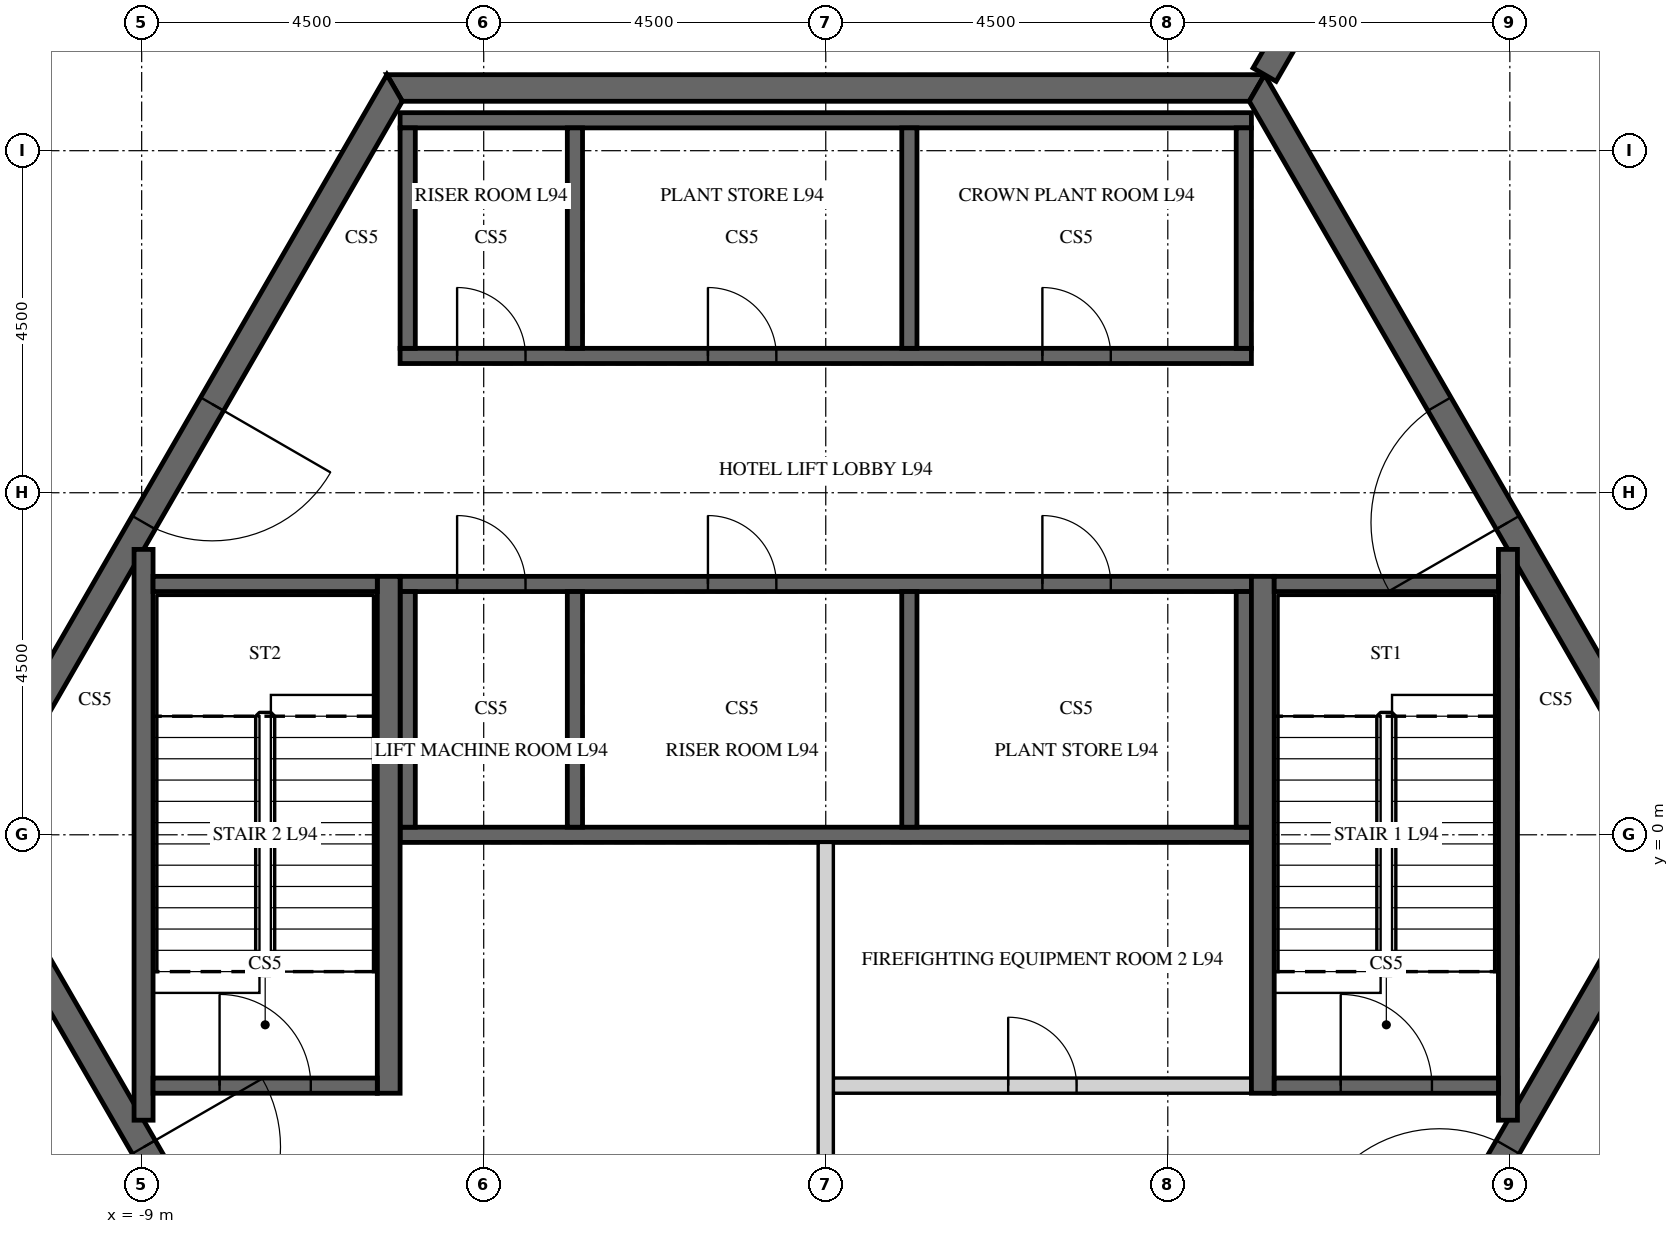
"""IFC4 building model, lengths in metres.
Left out: names, types, materials, properties, quantities, classifications, styles, units other than length and angle.
Written with IfcOpenShell. Run it as: python <this file> out.ifc"""

import sys

from ifc_helpers import new_model, si_unit, direction, frame, frame_2d, origin, place, context, subcontext, project, spatial, polyline, rectangle, outline, extrude, element, fill, save


model = new_model("IFC4")
c1 = context("Model", 3, precision=1e-05, world=origin(), true_north=direction((0.0, 1.0)))
c2 = subcontext(c1, "Body", "Model", "MODEL_VIEW")
j1 = project(units=[si_unit("LENGTHUNIT", "METRE"), si_unit("PLANEANGLEUNIT", "RADIAN")], contexts=[c1])
p1 = place(None, origin())
s1 = spatial("IfcSite", under=j1, at=p1, CompositionType="ELEMENT")
p2 = place(p1, origin())
s2 = spatial("IfcBuilding", under=s1, at=p2, CompositionType="ELEMENT")
p3 = place(p2, frame((0.0, 0.0, 397.2)))
s3 = spatial("IfcBuildingStorey", under=s2, at=p3, CompositionType="ELEMENT", Elevation=397.2)
p4 = place(p3, frame((9.618, 14.174, 4.5), z_axis=(0.0, 0.0, 1.0), x_axis=(0.559191500603, -0.8290385188, 0.0)))
e1 = element("IfcWall", 1, at=p4, inside=s3, PredefinedType="PARAPET", context=c2, shape_type="SweptSolid", body=[
    extrude(outline(polyline([(0.008, -0.1), (13.852, -0.1), (13.871, 0.1), (-0.008, 0.1), (0.008, -0.1)])), origin(), (0.0, 0.0, 1.0), 1.1),
])
p5 = place(p3, frame((-10.025, -14.436, 4.5), z_axis=(0.0, 0.0, 1.0), x_axis=(-0.500009078442, 0.86602016228, 0.0)))
e2 = element("IfcWall", 2, at=p5, inside=s3, PredefinedType="PARAPET", context=c2, shape_type="SweptSolid", body=[
    extrude(outline(polyline([(0.009, -0.1), (13.854, -0.1), (13.87, 0.1), (-0.009, 0.1), (0.009, -0.1)])), origin(), (0.0, 0.0, 1.0), 1.1),
])
p6 = place(p3, frame((-5.673, 9.825, -0.2), z_axis=(0.0, 0.0, 1.0), x_axis=(-0.499995046907, -0.866028263435, 0.0)))
e3 = element("IfcWall", 3, at=p6, inside=s3, PredefinedType="SHEAR", context=c2, shape_type="SweptSolid", body=[
    extrude(outline(polyline([(-0.101, -0.175), (11.446, -0.175), (11.244, 0.175), (0.101, 0.175), (-0.101, -0.175)])), origin(), (0.0, 0.0, 1.0), 4.5),
])
p7 = place(p6, frame((4.801, 0.0, 0.2)))
e4 = element("IfcOpeningElement", 4, at=p7, cuts=e3, PredefinedType="OPENING", context=c2, shape_type="SweptSolid", body=[
    extrude(rectangle(XDim=1.8, YDim=2.4, at=frame_2d((0.9, 1.2))), frame((0.0, 0.185, 0.0), z_axis=(0.0, -1.0, 0.0), x_axis=(1.0, 0.0, 0.0)), (0.0, 0.0, 1.0), 0.37),
])
p8 = place(p3, frame((-11.345, 0.0, -0.2), z_axis=(0.0, 0.0, 1.0), x_axis=(0.499995046907, -0.866028263435, 0.0)))
e5 = element("IfcWall", 5, at=p8, inside=s3, PredefinedType="SHEAR", context=c2, shape_type="SweptSolid", body=[
    extrude(outline(polyline([(-0.101, -0.175), (11.446, -0.175), (11.244, 0.175), (0.101, 0.175), (-0.101, -0.175)])), origin(), (0.0, 0.0, 1.0), 4.5),
])
p9 = place(p8, frame((4.744, 0.0, 0.2)))
e6 = element("IfcOpeningElement", 6, at=p9, cuts=e5, PredefinedType="OPENING", context=c2, shape_type="SweptSolid", body=[
    extrude(rectangle(XDim=1.8, YDim=2.4, at=frame_2d((0.9, 1.2))), frame((0.0, 0.185, 0.0), z_axis=(0.0, -1.0, 0.0), x_axis=(1.0, 0.0, 0.0)), (0.0, 0.0, 1.0), 0.37),
])
p10 = place(p3, frame((5.673, -9.825, -0.2), z_axis=(0.0, 0.0, 1.0), x_axis=(0.499995046907, 0.866028263435, 0.0)))
e7 = element("IfcWall", 7, at=p10, inside=s3, PredefinedType="SHEAR", context=c2, shape_type="SweptSolid", body=[
    extrude(outline(polyline([(-0.101, -0.175), (11.446, -0.175), (11.244, 0.175), (0.101, 0.175), (-0.101, -0.175)])), origin(), (0.0, 0.0, 1.0), 4.5),
])
p11 = place(p10, frame((4.801, 0.0, 0.2)))
e8 = element("IfcOpeningElement", 8, at=p11, cuts=e7, PredefinedType="OPENING", context=c2, shape_type="SweptSolid", body=[
    extrude(rectangle(XDim=1.8, YDim=2.4, at=frame_2d((0.9, 1.2))), frame((0.0, 0.185, 0.0), z_axis=(0.0, -1.0, 0.0), x_axis=(1.0, 0.0, 0.0)), (0.0, 0.0, 1.0), 0.37),
])
p12 = place(p3, frame((11.345, 0.0, -0.2), z_axis=(0.0, 0.0, 1.0), x_axis=(-0.499995046907, 0.866028263435, 0.0)))
e9 = element("IfcWall", 9, at=p12, inside=s3, PredefinedType="SHEAR", context=c2, shape_type="SweptSolid", body=[
    extrude(outline(polyline([(-0.101, -0.175), (11.446, -0.175), (11.244, 0.175), (0.101, 0.175), (-0.101, -0.175)])), origin(), (0.0, 0.0, 1.0), 4.5),
])
p13 = place(p12, frame((4.744, 0.0, 0.2)))
e10 = element("IfcOpeningElement", 10, at=p13, cuts=e9, PredefinedType="OPENING", context=c2, shape_type="SweptSolid", body=[
    extrude(rectangle(XDim=1.8, YDim=2.4, at=frame_2d((0.9, 1.2))), frame((0.0, 0.185, 0.0), z_axis=(0.0, -1.0, 0.0), x_axis=(1.0, 0.0, 0.0)), (0.0, 0.0, 1.0), 0.37),
])
p14 = place(p3, frame((5.673, 9.825, -0.2), z_axis=(0.0, 0.0, 1.0), x_axis=(-1.0, 0.0, 0.0)))
e11 = element("IfcWall", 11, at=p14, inside=s3, PredefinedType="SHEAR", context=c2, shape_type="SweptSolid", body=[
    extrude(outline(polyline([(-0.101, -0.175), (11.446, -0.175), (11.244, 0.175), (0.101, 0.175), (-0.101, -0.175)])), origin(), (0.0, 0.0, 1.0), 4.5),
])
p15 = place(p3, frame((5.773, 10.0, -0.2), z_axis=(0.0, 0.0, 1.0), x_axis=(0.499991653138, 0.866030222794, 0.0)))
e12 = element("IfcWall", 12, at=p15, inside=s3, PredefinedType="SHEAR", context=c2, shape_type="SweptSolid", body=[
    extrude(rectangle(XDim=5.705, YDim=0.35, at=frame_2d((2.852, 0.0))), origin(), (0.0, 0.0, 1.0), 4.5),
])
p16 = place(p15, frame((0.552, 0.0, 0.2)))
e13 = element("IfcOpeningElement", 13, at=p16, cuts=e12, PredefinedType="OPENING", context=c2, shape_type="SweptSolid", body=[
    extrude(rectangle(XDim=1.8, YDim=2.4, at=frame_2d((0.9, 1.2))), frame((0.0, 0.185, 0.0), z_axis=(0.0, -1.0, 0.0), x_axis=(1.0, 0.0, 0.0)), (0.0, 0.0, 1.0), 0.37),
])
p17 = place(p3, frame((-5.6, 6.3, -0.2), z_axis=(0.0, 0.0, 1.0), x_axis=(1.0, 0.0, 0.0)))
e14 = element("IfcWall", 14, at=p17, inside=s3, PredefinedType="SHEAR", context=c2, shape_type="SweptSolid", body=[
    extrude(rectangle(XDim=11.2, YDim=0.2, at=frame_2d((5.6, 0.0))), origin(), (0.0, 0.0, 1.0), 4.5),
])
p18 = place(p17, frame((0.75, 0.0, 0.2)))
e15 = element("IfcOpeningElement", 15, at=p18, cuts=e14, PredefinedType="OPENING", context=c2, shape_type="SweptSolid", body=[
    extrude(rectangle(XDim=0.9, YDim=2.1, at=frame_2d((0.45, 1.05))), frame((0.0, 0.11, 0.0), z_axis=(0.0, -1.0, 0.0), x_axis=(1.0, 0.0, 0.0)), (0.0, 0.0, 1.0), 0.22),
])
p19 = place(p17, frame((4.05, 0.0, 0.2)))
e16 = element("IfcOpeningElement", 16, at=p19, cuts=e14, PredefinedType="OPENING", context=c2, shape_type="SweptSolid", body=[
    extrude(rectangle(XDim=0.9, YDim=2.1, at=frame_2d((0.45, 1.05))), frame((0.0, 0.11, 0.0), z_axis=(0.0, -1.0, 0.0), x_axis=(1.0, 0.0, 0.0)), (0.0, 0.0, 1.0), 0.22),
])
p20 = place(p17, frame((8.45, 0.0, 0.2)))
e17 = element("IfcOpeningElement", 17, at=p20, cuts=e14, PredefinedType="OPENING", context=c2, shape_type="SweptSolid", body=[
    extrude(rectangle(XDim=0.9, YDim=2.1, at=frame_2d((0.45, 1.05))), frame((0.0, 0.11, 0.0), z_axis=(0.0, -1.0, 0.0), x_axis=(1.0, 0.0, 0.0)), (0.0, 0.0, 1.0), 0.22),
])
p21 = place(p3, frame((-5.6, 9.4, -0.2), z_axis=(0.0, 0.0, 1.0), x_axis=(1.0, 0.0, 0.0)))
e18 = element("IfcWall", 18, at=p21, inside=s3, PredefinedType="SHEAR", context=c2, shape_type="SweptSolid", body=[
    extrude(rectangle(XDim=11.2, YDim=0.2, at=frame_2d((5.6, 0.0))), origin(), (0.0, 0.0, 1.0), 4.5),
])
for number, where, z_axis, x_axis in (
    (19, (-5.5, 6.4, -0.2), (0.0, 0.0, 1.0), (0.0, 1.0, 0.0)),
    (20, (-3.3, 6.4, -0.2), (0.0, 0.0, 1.0), (0.0, 1.0, 0.0)),
    (21, (1.1, 6.4, -0.2), (0.0, 0.0, 1.0), (0.0, 1.0, 0.0)),
    (22, (5.5, 6.4, -0.2), (0.0, 0.0, 1.0), (0.0, 1.0, 0.0)),
):
    element("IfcWall", number, at=place(p3, frame(where, z_axis=z_axis, x_axis=x_axis)), inside=s3, PredefinedType="SHEAR", context=c2, shape_type="SweptSolid", body=[
        extrude(rectangle(XDim=2.9, YDim=0.2, at=frame_2d((1.45, 0.0))), origin(), (0.0, 0.0, 1.0), 4.5),
    ])
p22 = place(p3, frame((-5.6, 3.3, -0.2), z_axis=(0.0, 0.0, 1.0), x_axis=(1.0, 0.0, 0.0)))
e23 = element("IfcWall", 23, at=p22, inside=s3, PredefinedType="SHEAR", context=c2, shape_type="SweptSolid", body=[
    extrude(rectangle(XDim=11.2, YDim=0.2, at=frame_2d((5.6, 0.0))), origin(), (0.0, 0.0, 1.0), 4.5),
])
p23 = place(p22, frame((0.75, 0.0, 0.2)))
e24 = element("IfcOpeningElement", 24, at=p23, cuts=e23, PredefinedType="OPENING", context=c2, shape_type="SweptSolid", body=[
    extrude(rectangle(XDim=0.9, YDim=2.1, at=frame_2d((0.45, 1.05))), frame((0.0, 0.11, 0.0), z_axis=(0.0, -1.0, 0.0), x_axis=(1.0, 0.0, 0.0)), (0.0, 0.0, 1.0), 0.22),
])
p24 = place(p22, frame((4.05, 0.0, 0.2)))
e25 = element("IfcOpeningElement", 25, at=p24, cuts=e23, PredefinedType="OPENING", context=c2, shape_type="SweptSolid", body=[
    extrude(rectangle(XDim=0.9, YDim=2.1, at=frame_2d((0.45, 1.05))), frame((0.0, 0.11, 0.0), z_axis=(0.0, -1.0, 0.0), x_axis=(1.0, 0.0, 0.0)), (0.0, 0.0, 1.0), 0.22),
])
p25 = place(p22, frame((8.45, 0.0, 0.2)))
e26 = element("IfcOpeningElement", 26, at=p25, cuts=e23, PredefinedType="OPENING", context=c2, shape_type="SweptSolid", body=[
    extrude(rectangle(XDim=0.9, YDim=2.1, at=frame_2d((0.45, 1.05))), frame((0.0, 0.11, 0.0), z_axis=(0.0, -1.0, 0.0), x_axis=(1.0, 0.0, 0.0)), (0.0, 0.0, 1.0), 0.22),
])
p26 = place(p3, frame((-5.6, 0.0, -0.2), z_axis=(0.0, 0.0, 1.0), x_axis=(1.0, 0.0, 0.0)))
e27 = element("IfcWall", 27, at=p26, inside=s3, PredefinedType="SHEAR", context=c2, shape_type="SweptSolid", body=[
    extrude(rectangle(XDim=11.2, YDim=0.2, at=frame_2d((5.6, 0.0))), origin(), (0.0, 0.0, 1.0), 4.5),
])
for number, where, z_axis, x_axis in (
    (28, (-5.5, 0.1, -0.2), (0.0, 0.0, 1.0), (0.0, 1.0, 0.0)),
    (29, (-3.3, 0.1, -0.2), (0.0, 0.0, 1.0), (0.0, 1.0, 0.0)),
    (30, (1.1, 0.1, -0.2), (0.0, 0.0, 1.0), (0.0, 1.0, 0.0)),
    (31, (5.5, 0.1, -0.2), (0.0, 0.0, 1.0), (0.0, 1.0, 0.0)),
):
    element("IfcWall", number, at=place(p3, frame(where, z_axis=z_axis, x_axis=x_axis)), inside=s3, PredefinedType="SHEAR", context=c2, shape_type="SweptSolid", body=[
        extrude(rectangle(XDim=3.1, YDim=0.2, at=frame_2d((1.55, 0.0))), origin(), (0.0, 0.0, 1.0), 4.5),
    ])
p27 = place(p3, frame((0.1, -3.3, 0.0), z_axis=(0.0, 0.0, 1.0), x_axis=(1.0, 0.0, 0.0)))
e32 = element("IfcWall", 32, at=p27, inside=s3, PredefinedType="PARTITIONING", context=c2, shape_type="SweptSolid", body=[
    extrude(rectangle(XDim=5.5, YDim=0.2, at=frame_2d((2.75, 0.0))), origin(), (0.0, 0.0, 1.0), 4.3),
])
p28 = place(p27, frame((2.3, 0.0, 0.0)))
e33 = element("IfcOpeningElement", 33, at=p28, cuts=e32, PredefinedType="OPENING", context=c2, shape_type="SweptSolid", body=[
    extrude(rectangle(XDim=0.9, YDim=2.1, at=frame_2d((0.45, 1.05))), frame((0.0, 0.11, 0.0), z_axis=(0.0, -1.0, 0.0), x_axis=(1.0, 0.0, 0.0)), (0.0, 0.0, 1.0), 0.22),
])
p29 = place(p3, frame((0.0, -6.2, 0.0), z_axis=(0.0, 0.0, 1.0), x_axis=(0.0, 1.0, 0.0)))
e34 = element("IfcWall", 34, at=p29, inside=s3, PredefinedType="PARTITIONING", context=c2, shape_type="SweptSolid", body=[
    extrude(rectangle(XDim=6.1, YDim=0.2, at=frame_2d((3.05, 0.0))), origin(), (0.0, 0.0, 1.0), 4.3),
])
p30 = place(p3, frame((5.75, -3.4, -0.2), z_axis=(0.0, 0.0, 1.0), x_axis=(0.0, 1.0, 0.0)))
e35 = element("IfcWall", 35, at=p30, inside=s3, PredefinedType="SHEAR", context=c2, shape_type="SweptSolid", body=[
    extrude(rectangle(XDim=6.8, YDim=0.3, at=frame_2d((3.4, 0.0))), origin(), (0.0, 0.0, 1.0), 4.5),
])
p31 = place(p3, frame((8.975, -3.755, -0.2), z_axis=(0.0, 0.0, 1.0), x_axis=(0.0, 1.0, 0.0)))
e36 = element("IfcWall", 36, at=p31, inside=s3, PredefinedType="SHEAR", context=c2, shape_type="SweptSolid", body=[
    extrude(rectangle(XDim=7.51, YDim=0.25, at=frame_2d((3.755, 0.0))), origin(), (0.0, 0.0, 1.0), 4.5),
])
p32 = place(p3, frame((5.9, 3.3, -0.2), z_axis=(0.0, 0.0, 1.0), x_axis=(1.0, 0.0, 0.0)))
e37 = element("IfcWall", 37, at=p32, inside=s3, PredefinedType="SHEAR", context=c2, shape_type="SweptSolid", body=[
    extrude(rectangle(XDim=2.95, YDim=0.2, at=frame_2d((1.475, 0.0))), origin(), (0.0, 0.0, 1.0), 4.5),
])
p33 = place(p3, frame((5.9, -3.3, -0.2), z_axis=(0.0, 0.0, 1.0), x_axis=(1.0, 0.0, 0.0)))
e38 = element("IfcWall", 38, at=p33, inside=s3, PredefinedType="SHEAR", context=c2, shape_type="SweptSolid", body=[
    extrude(rectangle(XDim=2.95, YDim=0.2, at=frame_2d((1.475, 0.0))), origin(), (0.0, 0.0, 1.0), 4.5),
])
p34 = place(p33, frame((0.875, 0.0, 0.2)))
e39 = element("IfcOpeningElement", 39, at=p34, cuts=e38, PredefinedType="OPENING", context=c2, shape_type="SweptSolid", body=[
    extrude(rectangle(XDim=1.2, YDim=2.4, at=frame_2d((0.6, 1.2))), frame((0.0, 0.11, 0.0), z_axis=(0.0, -1.0, 0.0), x_axis=(1.0, 0.0, 0.0)), (0.0, 0.0, 1.0), 0.22),
])
p35 = place(p3, frame((-5.75, -3.4, -0.2), z_axis=(0.0, 0.0, 1.0), x_axis=(0.0, 1.0, 0.0)))
e40 = element("IfcWall", 40, at=p35, inside=s3, PredefinedType="SHEAR", context=c2, shape_type="SweptSolid", body=[
    extrude(rectangle(XDim=6.8, YDim=0.3, at=frame_2d((3.4, 0.0))), origin(), (0.0, 0.0, 1.0), 4.5),
])
p36 = place(p3, frame((-8.975, -3.755, -0.2), z_axis=(0.0, 0.0, 1.0), x_axis=(0.0, 1.0, 0.0)))
e41 = element("IfcWall", 41, at=p36, inside=s3, PredefinedType="SHEAR", context=c2, shape_type="SweptSolid", body=[
    extrude(rectangle(XDim=7.51, YDim=0.25, at=frame_2d((3.755, 0.0))), origin(), (0.0, 0.0, 1.0), 4.5),
])
p37 = place(p3, frame((-8.85, 3.3, -0.2), z_axis=(0.0, 0.0, 1.0), x_axis=(1.0, 0.0, 0.0)))
e42 = element("IfcWall", 42, at=p37, inside=s3, PredefinedType="SHEAR", context=c2, shape_type="SweptSolid", body=[
    extrude(rectangle(XDim=2.95, YDim=0.2, at=frame_2d((1.475, 0.0))), origin(), (0.0, 0.0, 1.0), 4.5),
])
p38 = place(p3, frame((-8.85, -3.3, -0.2), z_axis=(0.0, 0.0, 1.0), x_axis=(1.0, 0.0, 0.0)))
e43 = element("IfcWall", 43, at=p38, inside=s3, PredefinedType="SHEAR", context=c2, shape_type="SweptSolid", body=[
    extrude(rectangle(XDim=2.95, YDim=0.2, at=frame_2d((1.475, 0.0))), origin(), (0.0, 0.0, 1.0), 4.5),
])
p39 = place(p38, frame((0.875, 0.0, 0.2)))
e44 = element("IfcOpeningElement", 44, at=p39, cuts=e43, PredefinedType="OPENING", context=c2, shape_type="SweptSolid", body=[
    extrude(rectangle(XDim=1.2, YDim=2.4, at=frame_2d((0.6, 1.2))), frame((0.0, 0.11, 0.0), z_axis=(0.0, -1.0, 0.0), x_axis=(1.0, 0.0, 0.0)), (0.0, 0.0, 1.0), 0.22),
])
p40 = place(p7, origin())
e45 = element("IfcDoor", 45, at=p40, inside=s3, OperationType="DOUBLE_DOOR_SINGLE_SWING", PredefinedType="DOOR", context=c2, shape_type="SweptSolid", body=[
    extrude(rectangle(XDim=1.8, YDim=2.4, at=frame_2d((0.9, 1.2))), frame((0.0, 0.025, 0.0), z_axis=(0.0, -1.0, 0.0), x_axis=(1.0, 0.0, 0.0)), (0.0, 0.0, 1.0), 0.05),
])
fill(e4, e45)
p41 = place(p13, origin())
e46 = element("IfcDoor", 46, at=p41, inside=s3, OperationType="DOUBLE_DOOR_SINGLE_SWING", PredefinedType="DOOR", context=c2, shape_type="SweptSolid", body=[
    extrude(rectangle(XDim=1.8, YDim=2.4, at=frame_2d((0.9, 1.2))), frame((0.0, 0.025, 0.0), z_axis=(0.0, -1.0, 0.0), x_axis=(1.0, 0.0, 0.0)), (0.0, 0.0, 1.0), 0.05),
])
fill(e10, e46)
p42 = place(p9, origin())
e47 = element("IfcDoor", 47, at=p42, inside=s3, OperationType="DOUBLE_DOOR_SINGLE_SWING", PredefinedType="DOOR", context=c2, shape_type="SweptSolid", body=[
    extrude(rectangle(XDim=1.8, YDim=2.4, at=frame_2d((0.9, 1.2))), frame((0.0, 0.025, 0.0), z_axis=(0.0, -1.0, 0.0), x_axis=(1.0, 0.0, 0.0)), (0.0, 0.0, 1.0), 0.05),
])
fill(e6, e47)
p43 = place(p11, origin())
e48 = element("IfcDoor", 48, at=p43, inside=s3, OperationType="DOUBLE_DOOR_SINGLE_SWING", PredefinedType="DOOR", context=c2, shape_type="SweptSolid", body=[
    extrude(rectangle(XDim=1.8, YDim=2.4, at=frame_2d((0.9, 1.2))), frame((0.0, 0.025, 0.0), z_axis=(0.0, -1.0, 0.0), x_axis=(1.0, 0.0, 0.0)), (0.0, 0.0, 1.0), 0.05),
])
fill(e8, e48)
p44 = place(p28, origin())
e49 = element("IfcDoor", 49, at=p44, inside=s3, OperationType="SINGLE_SWING_LEFT", PredefinedType="DOOR", context=c2, shape_type="SweptSolid", body=[
    extrude(rectangle(XDim=0.9, YDim=2.1, at=frame_2d((0.45, 1.05))), frame((0.0, 0.025, 0.0), z_axis=(0.0, -1.0, 0.0), x_axis=(1.0, 0.0, 0.0)), (0.0, 0.0, 1.0), 0.05),
])
fill(e33, e49)
p45 = place(p18, origin())
e50 = element("IfcDoor", 50, at=p45, inside=s3, OperationType="SINGLE_SWING_LEFT", PredefinedType="DOOR", context=c2, shape_type="SweptSolid", body=[
    extrude(rectangle(XDim=0.9, YDim=2.1, at=frame_2d((0.45, 1.05))), frame((0.0, 0.025, 0.0), z_axis=(0.0, -1.0, 0.0), x_axis=(1.0, 0.0, 0.0)), (0.0, 0.0, 1.0), 0.05),
])
fill(e15, e50)
p46 = place(p19, origin())
e51 = element("IfcDoor", 51, at=p46, inside=s3, OperationType="SINGLE_SWING_LEFT", PredefinedType="DOOR", context=c2, shape_type="SweptSolid", body=[
    extrude(rectangle(XDim=0.9, YDim=2.1, at=frame_2d((0.45, 1.05))), frame((0.0, 0.025, 0.0), z_axis=(0.0, -1.0, 0.0), x_axis=(1.0, 0.0, 0.0)), (0.0, 0.0, 1.0), 0.05),
])
fill(e16, e51)
p47 = place(p20, origin())
e52 = element("IfcDoor", 52, at=p47, inside=s3, OperationType="SINGLE_SWING_LEFT", PredefinedType="DOOR", context=c2, shape_type="SweptSolid", body=[
    extrude(rectangle(XDim=0.9, YDim=2.1, at=frame_2d((0.45, 1.05))), frame((0.0, 0.025, 0.0), z_axis=(0.0, -1.0, 0.0), x_axis=(1.0, 0.0, 0.0)), (0.0, 0.0, 1.0), 0.05),
])
fill(e17, e52)
p48 = place(p23, origin())
e53 = element("IfcDoor", 53, at=p48, inside=s3, OperationType="SINGLE_SWING_LEFT", PredefinedType="DOOR", context=c2, shape_type="SweptSolid", body=[
    extrude(rectangle(XDim=0.9, YDim=2.1, at=frame_2d((0.45, 1.05))), frame((0.0, 0.025, 0.0), z_axis=(0.0, -1.0, 0.0), x_axis=(1.0, 0.0, 0.0)), (0.0, 0.0, 1.0), 0.05),
])
fill(e24, e53)
p49 = place(p24, origin())
e54 = element("IfcDoor", 54, at=p49, inside=s3, OperationType="SINGLE_SWING_LEFT", PredefinedType="DOOR", context=c2, shape_type="SweptSolid", body=[
    extrude(rectangle(XDim=0.9, YDim=2.1, at=frame_2d((0.45, 1.05))), frame((0.0, 0.025, 0.0), z_axis=(0.0, -1.0, 0.0), x_axis=(1.0, 0.0, 0.0)), (0.0, 0.0, 1.0), 0.05),
])
fill(e25, e54)
p50 = place(p25, origin())
e55 = element("IfcDoor", 55, at=p50, inside=s3, OperationType="SINGLE_SWING_LEFT", PredefinedType="DOOR", context=c2, shape_type="SweptSolid", body=[
    extrude(rectangle(XDim=0.9, YDim=2.1, at=frame_2d((0.45, 1.05))), frame((0.0, 0.025, 0.0), z_axis=(0.0, -1.0, 0.0), x_axis=(1.0, 0.0, 0.0)), (0.0, 0.0, 1.0), 0.05),
])
fill(e26, e55)
p51 = place(p34, origin())
e56 = element("IfcDoor", 56, at=p51, inside=s3, OperationType="SINGLE_SWING_LEFT", PredefinedType="DOOR", context=c2, shape_type="SweptSolid", body=[
    extrude(rectangle(XDim=1.2, YDim=2.4, at=frame_2d((0.6, 1.2))), frame((0.0, 0.025, 0.0), z_axis=(0.0, -1.0, 0.0), x_axis=(1.0, 0.0, 0.0)), (0.0, 0.0, 1.0), 0.05),
])
fill(e39, e56)
p52 = place(p39, origin())
e57 = element("IfcDoor", 57, at=p52, inside=s3, OperationType="SINGLE_SWING_LEFT", PredefinedType="DOOR", context=c2, shape_type="SweptSolid", body=[
    extrude(rectangle(XDim=1.2, YDim=2.4, at=frame_2d((0.6, 1.2))), frame((0.0, 0.025, 0.0), z_axis=(0.0, -1.0, 0.0), x_axis=(1.0, 0.0, 0.0)), (0.0, 0.0, 1.0), 0.05),
])
fill(e44, e57)
save(model, sys.argv[1])
